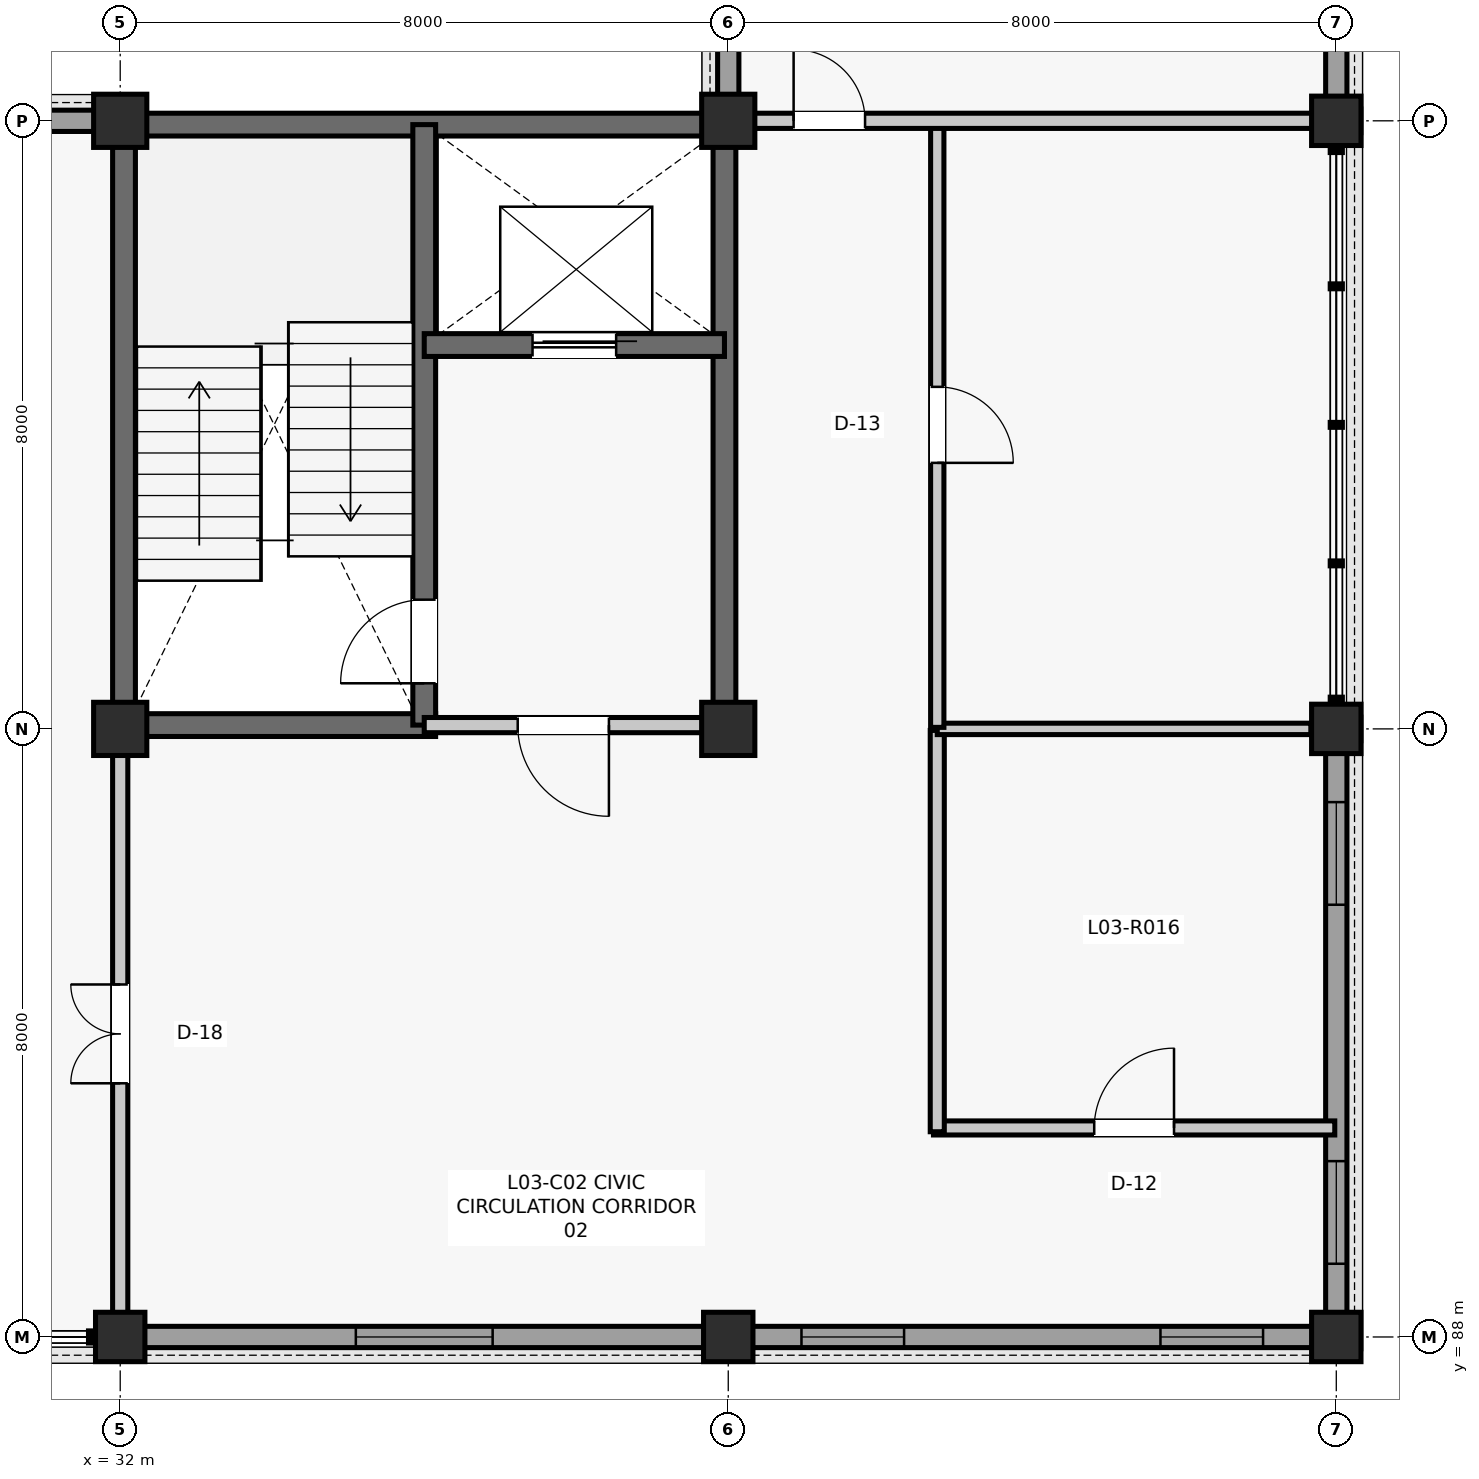
"""IFC4 building model, lengths in metres.
Left out: names, types, materials, properties, quantities, classifications, styles, units other than length and angle.
Written with IfcOpenShell. Run it as: python <this file> out.ifc"""

import sys

from ifc_helpers import new_model, si_unit, direction, frame, frame_2d, origin, origin_2d, place, context, subcontext, project, spatial, rectangle, extrude, element, fill, save


model = new_model("IFC4")
c1 = context("Model", 3, precision=1e-05, world=origin(), true_north=direction((0.0, 1.0)))
c2 = subcontext(c1, "Body", "Model", "MODEL_VIEW")
j1 = project(units=[si_unit("LENGTHUNIT", "METRE"), si_unit("PLANEANGLEUNIT", "RADIAN")], contexts=[c1])
p1 = place(None, origin())
s1 = spatial("IfcSite", under=j1, at=p1, CompositionType="ELEMENT")
p2 = place(p1, origin())
s2 = spatial("IfcBuilding", under=s1, at=p2, CompositionType="ELEMENT")
p3 = place(p2, frame((0.0, 0.0, 13.86)))
s3 = spatial("IfcBuildingStorey", under=s2, at=p3, CompositionType="ELEMENT", Elevation=13.86)
p4 = place(p3, frame((32.0, 88.0, 0.0), z_axis=(0.0, 0.0, 1.0), x_axis=(1.0, 0.0, 0.0)))
e1 = element("IfcColumn", 1, at=p4, inside=s3, PredefinedType="COLUMN", context=c2, shape_type="SweptSolid", body=[
    extrude(rectangle(XDim=0.65, YDim=0.65, at=origin_2d()), origin(), (0.0, 0.0, 1.0), 3.96),
])
for number, where, z_axis, x_axis in (
    (2, (32.0, 96.0, 0.0), (0.0, 0.0, 1.0), (1.0, 0.0, 0.0)),
    (3, (32.0, 104.0, 0.0), (0.0, 0.0, 1.0), (1.0, 0.0, 0.0)),
):
    element("IfcColumn", number, at=place(p3, frame(where, z_axis=z_axis, x_axis=x_axis)), inside=s3, PredefinedType="COLUMN", context=c2, shape_type="SweptSolid", body=[
        extrude(rectangle(XDim=0.7, YDim=0.7, at=origin_2d()), origin(), (0.0, 0.0, 1.0), 3.96),
    ])
p5 = place(p3, frame((40.0, 88.0, 0.0), z_axis=(0.0, 0.0, 1.0), x_axis=(1.0, 0.0, 0.0)))
e4 = element("IfcColumn", 4, at=p5, inside=s3, PredefinedType="COLUMN", context=c2, shape_type="SweptSolid", body=[
    extrude(rectangle(XDim=0.65, YDim=0.65, at=origin_2d()), origin(), (0.0, 0.0, 1.0), 3.96),
])
for number, where, z_axis, x_axis in (
    (5, (40.0, 96.0, 0.0), (0.0, 0.0, 1.0), (1.0, 0.0, 0.0)),
    (6, (40.0, 104.0, 0.0), (0.0, 0.0, 1.0), (1.0, 0.0, 0.0)),
):
    element("IfcColumn", number, at=place(p3, frame(where, z_axis=z_axis, x_axis=x_axis)), inside=s3, PredefinedType="COLUMN", context=c2, shape_type="SweptSolid", body=[
        extrude(rectangle(XDim=0.7, YDim=0.7, at=origin_2d()), origin(), (0.0, 0.0, 1.0), 3.96),
    ])
for number, where, z_axis, x_axis in (
    (7, (48.0, 88.0, 0.0), (0.0, 0.0, 1.0), (1.0, 0.0, 0.0)),
    (8, (48.0, 96.0, 0.0), (0.0, 0.0, 1.0), (1.0, 0.0, 0.0)),
    (9, (48.0, 104.0, 0.0), (0.0, 0.0, 1.0), (1.0, 0.0, 0.0)),
):
    element("IfcColumn", number, at=place(p3, frame(where, z_axis=z_axis, x_axis=x_axis)), inside=s3, PredefinedType="COLUMN", context=c2, shape_type="SweptSolid", body=[
        extrude(rectangle(XDim=0.65, YDim=0.65, at=origin_2d()), origin(), (0.0, 0.0, 1.0), 3.96),
    ])
p6 = place(p3, frame((24.31, 104.0, 0.0), z_axis=(0.0, 0.0, 1.0), x_axis=(1.0, 0.0, 0.0)))
e10 = element("IfcWall", 10, at=p6, inside=s3, PredefinedType="SOLIDWALL", context=c2, shape_type="SweptSolid", body=[
    extrude(rectangle(XDim=7.355, YDim=0.28, at=frame_2d((3.677, 0.0))), origin(), (0.0, 0.0, 1.0), 3.367),
])
p7 = place(p6, frame((2.778, 0.0, 1.35)))
e11 = element("IfcOpeningElement", 11, at=p7, cuts=e10, PredefinedType="OPENING", context=c2, shape_type="SweptSolid", body=[
    extrude(rectangle(XDim=1.8, YDim=1.2, at=frame_2d((0.9, 0.6))), frame((0.0, 0.15, 0.0), z_axis=(0.0, -1.0, 0.0), x_axis=(1.0, 0.0, 0.0)), (0.0, 0.0, 1.0), 0.3),
])
p8 = place(p3, frame((32.31, 88.0, 0.0), z_axis=(0.0, 0.0, 1.0), x_axis=(1.0, 0.0, 0.0)))
e12 = element("IfcWall", 12, at=p8, inside=s3, PredefinedType="SOLIDWALL", context=c2, shape_type="SweptSolid", body=[
    extrude(rectangle(XDim=7.38, YDim=0.28, at=frame_2d((3.69, 0.0))), origin(), (0.0, 0.0, 1.0), 3.304),
])
p9 = place(p8, frame((2.79, 0.0, 1.35)))
e13 = element("IfcOpeningElement", 13, at=p9, cuts=e12, PredefinedType="OPENING", context=c2, shape_type="SweptSolid", body=[
    extrude(rectangle(XDim=1.8, YDim=1.2, at=frame_2d((0.9, 0.6))), frame((0.0, 0.15, 0.0), z_axis=(0.0, -1.0, 0.0), x_axis=(1.0, 0.0, 0.0)), (0.0, 0.0, 1.0), 0.3),
])
p10 = place(p3, frame((40.31, 88.0, 0.0), z_axis=(0.0, 0.0, 1.0), x_axis=(1.0, 0.0, 0.0)))
e14 = element("IfcWall", 14, at=p10, inside=s3, PredefinedType="SOLIDWALL", context=c2, shape_type="SweptSolid", body=[
    extrude(rectangle(XDim=7.38, YDim=0.28, at=frame_2d((3.69, 0.0))), origin(), (0.0, 0.0, 1.0), 3.367),
])
p11 = place(p10, frame((0.653, 0.0, 0.95)))
e15 = element("IfcOpeningElement", 15, at=p11, cuts=e14, PredefinedType="OPENING", context=c2, shape_type="SweptSolid", body=[
    extrude(rectangle(XDim=1.35, YDim=1.9, at=frame_2d((0.675, 0.95))), frame((0.0, 0.15, 0.0), z_axis=(0.0, -1.0, 0.0), x_axis=(1.0, 0.0, 0.0)), (0.0, 0.0, 1.0), 0.3),
])
p12 = place(p10, frame((5.377, 0.0, 0.95)))
e16 = element("IfcOpeningElement", 16, at=p12, cuts=e14, PredefinedType="OPENING", context=c2, shape_type="SweptSolid", body=[
    extrude(rectangle(XDim=1.35, YDim=1.9, at=frame_2d((0.675, 0.95))), frame((0.0, 0.15, 0.0), z_axis=(0.0, -1.0, 0.0), x_axis=(1.0, 0.0, 0.0)), (0.0, 0.0, 1.0), 0.3),
])
p13 = place(p3, frame((48.0, 88.31, 0.0), z_axis=(0.0, 0.0, 1.0), x_axis=(0.0, 1.0, 0.0)))
e17 = element("IfcWall", 17, at=p13, inside=s3, PredefinedType="SOLIDWALL", context=c2, shape_type="SweptSolid", body=[
    extrude(rectangle(XDim=7.38, YDim=0.28, at=frame_2d((3.69, 0.0))), origin(), (0.0, 0.0, 1.0), 3.3),
])
p14 = place(p13, frame((0.653, 0.0, 0.95)))
e18 = element("IfcOpeningElement", 18, at=p14, cuts=e17, PredefinedType="OPENING", context=c2, shape_type="SweptSolid", body=[
    extrude(rectangle(XDim=1.35, YDim=1.9, at=frame_2d((0.675, 0.95))), frame((0.0, 0.15, 0.0), z_axis=(0.0, -1.0, 0.0), x_axis=(1.0, 0.0, 0.0)), (0.0, 0.0, 1.0), 0.3),
])
p15 = place(p13, frame((5.377, 0.0, 0.95)))
e19 = element("IfcOpeningElement", 19, at=p15, cuts=e17, PredefinedType="OPENING", context=c2, shape_type="SweptSolid", body=[
    extrude(rectangle(XDim=1.35, YDim=1.9, at=frame_2d((0.675, 0.95))), frame((0.0, 0.15, 0.0), z_axis=(0.0, -1.0, 0.0), x_axis=(1.0, 0.0, 0.0)), (0.0, 0.0, 1.0), 0.3),
])
p16 = place(p3, frame((40.0, 104.335, 0.0), z_axis=(0.0, 0.0, 1.0), x_axis=(0.0, 1.0, 0.0)))
e20 = element("IfcWall", 20, at=p16, inside=s3, PredefinedType="SOLIDWALL", context=c2, shape_type="SweptSolid", body=[
    extrude(rectangle(XDim=7.355, YDim=0.28, at=frame_2d((3.677, 0.0))), origin(), (0.0, 0.0, 1.0), 3.364),
])
p17 = place(p16, frame((3.002, 0.0, 0.9)))
e21 = element("IfcOpeningElement", 21, at=p17, cuts=e20, PredefinedType="OPENING", context=c2, shape_type="SweptSolid", body=[
    extrude(rectangle(XDim=1.35, YDim=1.9, at=frame_2d((0.675, 0.95))), frame((0.0, 0.15, 0.0), z_axis=(0.0, -1.0, 0.0), x_axis=(1.0, 0.0, 0.0)), (0.0, 0.0, 1.0), 0.3),
])
p18 = place(p3, frame((48.0, 104.31, 0.0), z_axis=(0.0, 0.0, 1.0), x_axis=(0.0, 1.0, 0.0)))
e22 = element("IfcWall", 22, at=p18, inside=s3, PredefinedType="SOLIDWALL", context=c2, shape_type="SweptSolid", body=[
    extrude(rectangle(XDim=7.38, YDim=0.28, at=frame_2d((3.69, 0.0))), origin(), (0.0, 0.0, 1.0), 3.304),
])
p19 = place(p18, frame((3.015, 0.0, 0.9)))
e23 = element("IfcOpeningElement", 23, at=p19, cuts=e22, PredefinedType="OPENING", context=c2, shape_type="SweptSolid", body=[
    extrude(rectangle(XDim=1.35, YDim=1.9, at=frame_2d((0.675, 0.95))), frame((0.0, 0.15, 0.0), z_axis=(0.0, -1.0, 0.0), x_axis=(1.0, 0.0, 0.0)), (0.0, 0.0, 1.0), 0.3),
])
for number, where, z_axis, x_axis in (
    (24, (32.05, 96.24, 0.0), (0.0, 0.0, 1.0), (0.0, 1.0, 0.0)),
    (25, (32.24, 103.95, 0.0), (0.0, 0.0, 1.0), (1.0, 0.0, 0.0)),
    (26, (39.95, 96.24, 0.0), (0.0, 0.0, 1.0), (0.0, 1.0, 0.0)),
):
    element("IfcWall", number, at=place(p3, frame(where, z_axis=z_axis, x_axis=x_axis)), inside=s3, PredefinedType="SHEAR", context=c2, shape_type="SweptSolid", body=[
        extrude(rectangle(XDim=7.52, YDim=0.3, at=frame_2d((3.76, 0.0))), origin(), (0.0, 0.0, 1.0), 3.725),
    ])
p20 = place(p3, frame((32.24, 96.05, 0.0), z_axis=(0.0, 0.0, 1.0), x_axis=(1.0, 0.0, 0.0)))
e27 = element("IfcWall", 27, at=p20, inside=s3, PredefinedType="SHEAR", context=c2, shape_type="SweptSolid", body=[
    extrude(rectangle(XDim=3.91, YDim=0.3, at=frame_2d((1.955, 0.0))), origin(), (0.0, 0.0, 1.0), 3.725),
])
p21 = place(p3, frame((36.0, 96.05, 0.0), z_axis=(0.0, 0.0, 1.0), x_axis=(0.0, 1.0, 0.0)))
e28 = element("IfcWall", 28, at=p21, inside=s3, PredefinedType="SHEAR", context=c2, shape_type="SweptSolid", body=[
    extrude(rectangle(XDim=7.9, YDim=0.3, at=frame_2d((3.95, 0.0))), origin(), (0.0, 0.0, 1.0), 3.725),
])
p22 = place(p21, frame((0.55, 0.0, 0.0)))
e29 = element("IfcOpeningElement", 29, at=p22, cuts=e28, PredefinedType="OPENING", context=c2, shape_type="SweptSolid", body=[
    extrude(rectangle(XDim=1.1, YDim=2.15, at=frame_2d((0.55, 1.075))), frame((0.0, 0.16, 0.0), z_axis=(0.0, -1.0, 0.0), x_axis=(1.0, 0.0, 0.0)), (0.0, 0.0, 1.0), 0.32),
])
p23 = place(p3, frame((36.0, 101.05, 0.0), z_axis=(0.0, 0.0, 1.0), x_axis=(1.0, 0.0, 0.0)))
e30 = element("IfcWall", 30, at=p23, inside=s3, PredefinedType="SHEAR", context=c2, shape_type="SweptSolid", body=[
    extrude(rectangle(XDim=3.95, YDim=0.3, at=frame_2d((1.975, 0.0))), origin(), (0.0, 0.0, 1.0), 3.725),
])
p24 = place(p23, frame((1.425, 0.0, 0.0)))
e31 = element("IfcOpeningElement", 31, at=p24, cuts=e30, PredefinedType="OPENING", context=c2, shape_type="SweptSolid", body=[
    extrude(rectangle(XDim=1.1, YDim=2.2, at=frame_2d((0.55, 1.1))), frame((0.0, 0.16, 0.0), z_axis=(0.0, -1.0, 0.0), x_axis=(1.0, 0.0, 0.0)), (0.0, 0.0, 1.0), 0.32),
])
p25 = place(p3, frame((36.0, 96.05, 0.0), z_axis=(0.0, 0.0, 1.0), x_axis=(1.0, 0.0, 0.0)))
e32 = element("IfcWall", 32, at=p25, inside=s3, PredefinedType="PARTITIONING", context=c2, shape_type="SweptSolid", body=[
    extrude(rectangle(XDim=3.66, YDim=0.2, at=frame_2d((1.83, 0.0))), origin(), (0.0, 0.0, 1.0), 3.247),
])
p26 = place(p25, frame((1.23, 0.0, 0.0)))
e33 = element("IfcOpeningElement", 33, at=p26, cuts=e32, PredefinedType="OPENING", context=c2, shape_type="SweptSolid", body=[
    extrude(rectangle(XDim=1.2, YDim=2.15, at=frame_2d((0.6, 1.075))), frame((0.0, 0.11, 0.0), z_axis=(0.0, -1.0, 0.0), x_axis=(1.0, 0.0, 0.0)), (0.0, 0.0, 1.0), 0.22),
])
p27 = place(p3, frame((42.7, 90.75, 0.0), z_axis=(0.0, 0.0, 1.0), x_axis=(1.0, 0.0, 0.0)))
e34 = element("IfcWall", 34, at=p27, inside=s3, PredefinedType="PARTITIONING", context=c2, shape_type="SweptSolid", body=[
    extrude(rectangle(XDim=5.28, YDim=0.185, at=frame_2d((2.64, 0.0))), origin(), (0.0, 0.0, 1.0), 3.293),
])
p28 = place(p27, frame((2.115, 0.0, 0.0)))
e35 = element("IfcOpeningElement", 35, at=p28, cuts=e34, PredefinedType="OPENING", context=c2, shape_type="SweptSolid", body=[
    extrude(rectangle(XDim=1.05, YDim=2.15, at=frame_2d((0.525, 1.075))), frame((0.0, 0.103, 0.0), z_axis=(0.0, -1.0, 0.0), x_axis=(1.0, 0.0, 0.0)), (0.0, 0.0, 1.0), 0.205),
])
p29 = place(p3, frame((42.75, 90.7, 0.0), z_axis=(0.0, 0.0, 1.0), x_axis=(0.0, 1.0, 0.0)))
e36 = element("IfcWall", 36, at=p29, inside=s3, PredefinedType="PARTITIONING", context=c2, shape_type="SweptSolid", body=[
    extrude(rectangle(XDim=5.28, YDim=0.185, at=frame_2d((2.64, 0.0))), origin(), (0.0, 0.0, 1.0), 3.253),
])
p30 = place(p3, frame((42.75, 96.0, 0.0), z_axis=(0.0, 0.0, 1.0), x_axis=(1.0, 0.0, 0.0)))
e37 = element("IfcWall", 37, at=p30, inside=s3, PredefinedType="PARTITIONING", context=c2, shape_type="SweptSolid", body=[
    extrude(rectangle(XDim=4.915, YDim=0.15, at=frame_2d((2.458, 0.0))), origin(), (0.0, 0.0, 1.0), 3.253),
])
p31 = place(p3, frame((42.75, 96.02, 0.0), z_axis=(0.0, 0.0, 1.0), x_axis=(0.0, 1.0, 0.0)))
e38 = element("IfcWall", 38, at=p31, inside=s3, PredefinedType="PARTITIONING", context=c2, shape_type="SweptSolid", body=[
    extrude(rectangle(XDim=7.96, YDim=0.175, at=frame_2d((3.98, 0.0))), origin(), (0.0, 0.0, 1.0), 3.241),
])
p32 = place(p31, frame((3.48, 0.0, 0.0)))
e39 = element("IfcOpeningElement", 39, at=p32, cuts=e38, PredefinedType="OPENING", context=c2, shape_type="SweptSolid", body=[
    extrude(rectangle(XDim=1.0, YDim=2.15, at=frame_2d((0.5, 1.075))), frame((0.0, 0.097, 0.0), z_axis=(0.0, -1.0, 0.0), x_axis=(1.0, 0.0, 0.0)), (0.0, 0.0, 1.0), 0.195),
])
p33 = place(p3, frame((32.0, 88.315, 0.0), z_axis=(0.0, 0.0, 1.0), x_axis=(0.0, 1.0, 0.0)))
e40 = element("IfcWall", 40, at=p33, inside=s3, PredefinedType="PARTITIONING", context=c2, shape_type="SweptSolid", body=[
    extrude(rectangle(XDim=7.345, YDim=0.2, at=frame_2d((3.672, 0.0))), origin(), (0.0, 0.0, 1.0), 3.247),
])
p34 = place(p33, frame((3.022, 0.0, 0.0)))
e41 = element("IfcOpeningElement", 41, at=p34, cuts=e40, PredefinedType="OPENING", context=c2, shape_type="SweptSolid", body=[
    extrude(rectangle(XDim=1.3, YDim=2.2, at=frame_2d((0.65, 1.1))), frame((0.0, 0.11, 0.0), z_axis=(0.0, -1.0, 0.0), x_axis=(1.0, 0.0, 0.0)), (0.0, 0.0, 1.0), 0.22),
])
p35 = place(p3, frame((40.34, 104.0, 0.0), z_axis=(0.0, 0.0, 1.0), x_axis=(1.0, 0.0, 0.0)))
e42 = element("IfcWall", 42, at=p35, inside=s3, PredefinedType="PARTITIONING", context=c2, shape_type="SweptSolid", body=[
    extrude(rectangle(XDim=7.345, YDim=0.2, at=frame_2d((3.672, 0.0))), origin(), (0.0, 0.0, 1.0), 3.241),
])
p36 = place(p35, frame((0.52, 0.0, 0.0)))
e43 = element("IfcOpeningElement", 43, at=p36, cuts=e42, PredefinedType="OPENING", context=c2, shape_type="SweptSolid", body=[
    extrude(rectangle(XDim=0.94, YDim=2.12, at=frame_2d((0.47, 1.06))), frame((0.0, 0.11, 0.0), z_axis=(0.0, -1.0, 0.0), x_axis=(1.0, 0.0, 0.0)), (0.0, 0.0, 1.0), 0.22),
])
p37 = place(p9, origin())
e44 = element("IfcWindow", 44, at=p37, inside=s3, PartitioningType="SINGLE_PANEL", PredefinedType="WINDOW", context=c2, shape_type="SweptSolid", body=[
    extrude(rectangle(XDim=1.8, YDim=1.2, at=frame_2d((0.9, 0.6))), frame((0.0, 0.03, 0.0), z_axis=(0.0, -1.0, 0.0), x_axis=(1.0, 0.0, 0.0)), (0.0, 0.0, 1.0), 0.06),
])
fill(e13, e44)
p38 = place(p11, origin())
e45 = element("IfcWindow", 45, at=p38, inside=s3, PartitioningType="SINGLE_PANEL", PredefinedType="WINDOW", context=c2, shape_type="SweptSolid", body=[
    extrude(rectangle(XDim=1.35, YDim=1.9, at=frame_2d((0.675, 0.95))), frame((0.0, 0.03, 0.0), z_axis=(0.0, -1.0, 0.0), x_axis=(1.0, 0.0, 0.0)), (0.0, 0.0, 1.0), 0.06),
])
fill(e15, e45)
p39 = place(p12, origin())
e46 = element("IfcWindow", 46, at=p39, inside=s3, PartitioningType="SINGLE_PANEL", PredefinedType="WINDOW", context=c2, shape_type="SweptSolid", body=[
    extrude(rectangle(XDim=1.35, YDim=1.9, at=frame_2d((0.675, 0.95))), frame((0.0, 0.03, 0.0), z_axis=(0.0, -1.0, 0.0), x_axis=(1.0, 0.0, 0.0)), (0.0, 0.0, 1.0), 0.06),
])
fill(e16, e46)
p40 = place(p14, origin())
e47 = element("IfcWindow", 47, at=p40, inside=s3, PartitioningType="SINGLE_PANEL", PredefinedType="WINDOW", context=c2, shape_type="SweptSolid", body=[
    extrude(rectangle(XDim=1.35, YDim=1.9, at=frame_2d((0.675, 0.95))), frame((0.0, 0.03, 0.0), z_axis=(0.0, -1.0, 0.0), x_axis=(1.0, 0.0, 0.0)), (0.0, 0.0, 1.0), 0.06),
])
fill(e18, e47)
p41 = place(p15, origin())
e48 = element("IfcWindow", 48, at=p41, inside=s3, PartitioningType="SINGLE_PANEL", PredefinedType="WINDOW", context=c2, shape_type="SweptSolid", body=[
    extrude(rectangle(XDim=1.35, YDim=1.9, at=frame_2d((0.675, 0.95))), frame((0.0, 0.03, 0.0), z_axis=(0.0, -1.0, 0.0), x_axis=(1.0, 0.0, 0.0)), (0.0, 0.0, 1.0), 0.06),
])
fill(e19, e48)
p42 = place(p22, origin())
e49 = element("IfcDoor", 49, at=p42, inside=s3, OperationType="SINGLE_SWING_LEFT", PredefinedType="DOOR", context=c2, shape_type="SweptSolid", body=[
    extrude(rectangle(XDim=1.1, YDim=2.15, at=frame_2d((0.55, 1.075))), frame((0.0, 0.025, 0.0), z_axis=(0.0, -1.0, 0.0), x_axis=(1.0, 0.0, 0.0)), (0.0, 0.0, 1.0), 0.05),
])
fill(e29, e49)
p43 = place(p24, origin())
e50 = element("IfcDoor", 50, at=p43, inside=s3, OperationType="SLIDING_TO_LEFT", PredefinedType="DOOR", context=c2, shape_type="SweptSolid", body=[
    extrude(rectangle(XDim=1.1, YDim=2.2, at=frame_2d((0.55, 1.1))), frame((0.0, 0.025, 0.0), z_axis=(0.0, -1.0, 0.0), x_axis=(1.0, 0.0, 0.0)), (0.0, 0.0, 1.0), 0.05),
])
fill(e31, e50)
p44 = place(p26, frame((1.2, 0.0, 0.0), z_axis=(0.0, 0.0, 1.0), x_axis=(-1.0, 0.0, 0.0)))
e51 = element("IfcDoor", 51, at=p44, inside=s3, OperationType="SINGLE_SWING_RIGHT", PredefinedType="DOOR", context=c2, shape_type="SweptSolid", body=[
    extrude(rectangle(XDim=1.2, YDim=2.15, at=frame_2d((0.6, 1.075))), frame((0.0, 0.025, 0.0), z_axis=(0.0, -1.0, 0.0), x_axis=(1.0, 0.0, 0.0)), (0.0, 0.0, 1.0), 0.05),
])
fill(e33, e51)
p45 = place(p28, origin())
e52 = element("IfcDoor", 52, at=p45, inside=s3, OperationType="SINGLE_SWING_RIGHT", PredefinedType="DOOR", context=c2, shape_type="SweptSolid", body=[
    extrude(rectangle(XDim=1.05, YDim=2.15, at=frame_2d((0.525, 1.075))), frame((0.0, 0.025, 0.0), z_axis=(0.0, -1.0, 0.0), x_axis=(1.0, 0.0, 0.0)), (0.0, 0.0, 1.0), 0.05),
])
fill(e35, e52)
p46 = place(p32, frame((1.0, 0.0, 0.0), z_axis=(0.0, 0.0, 1.0), x_axis=(-1.0, 0.0, 0.0)))
e53 = element("IfcDoor", 53, at=p46, inside=s3, OperationType="SINGLE_SWING_LEFT", PredefinedType="DOOR", context=c2, shape_type="SweptSolid", body=[
    extrude(rectangle(XDim=1.0, YDim=2.15, at=frame_2d((0.5, 1.075))), frame((0.0, 0.025, 0.0), z_axis=(0.0, -1.0, 0.0), x_axis=(1.0, 0.0, 0.0)), (0.0, 0.0, 1.0), 0.05),
])
fill(e39, e53)
p47 = place(p34, origin())
e54 = element("IfcDoor", 54, at=p47, inside=s3, OperationType="DOUBLE_DOOR_SINGLE_SWING", PredefinedType="DOOR", context=c2, shape_type="SweptSolid", body=[
    extrude(rectangle(XDim=1.3, YDim=2.2, at=frame_2d((0.65, 1.1))), frame((0.0, 0.025, 0.0), z_axis=(0.0, -1.0, 0.0), x_axis=(1.0, 0.0, 0.0)), (0.0, 0.0, 1.0), 0.05),
])
fill(e41, e54)
p48 = place(p36, origin())
e55 = element("IfcDoor", 55, at=p48, inside=s3, OperationType="SINGLE_SWING_LEFT", PredefinedType="DOOR", context=c2, shape_type="SweptSolid", body=[
    extrude(rectangle(XDim=0.94, YDim=2.12, at=frame_2d((0.47, 1.06))), frame((0.0, 0.025, 0.0), z_axis=(0.0, -1.0, 0.0), x_axis=(1.0, 0.0, 0.0)), (0.0, 0.0, 1.0), 0.05),
])
fill(e43, e55)
save(model, sys.argv[1])
